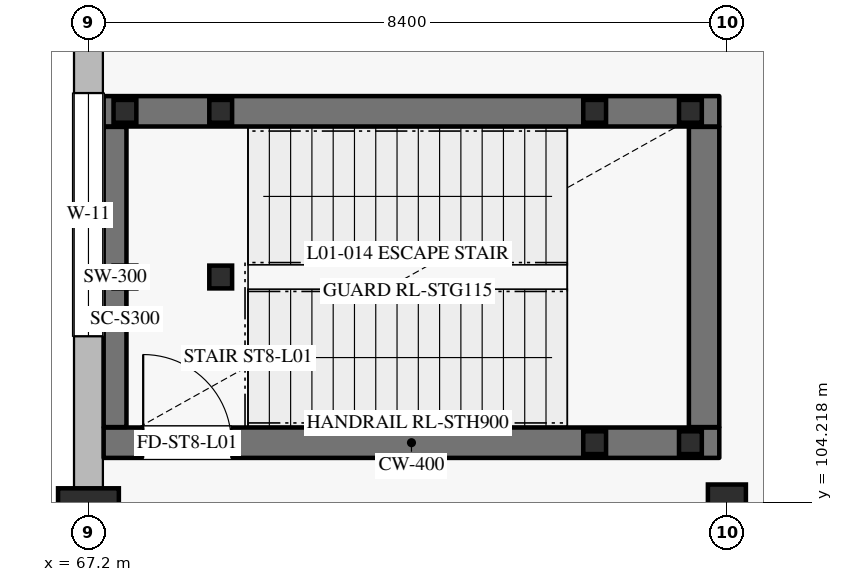
"""IFC4 building model, lengths in metres.
Left out: names, types, materials, properties, quantities, classifications, styles, units other than length and angle.
Written with IfcOpenShell. Run it as: python <this file> out.ifc"""

import sys

from ifc_helpers import new_model, si_unit, direction, frame, frame_2d, origin, origin_2d, place, context, subcontext, project, spatial, rectangle, hollow_rectangle, extrude, element, fill, save


model = new_model("IFC4")
c1 = context("Model", 3, precision=1e-05, world=origin(), true_north=direction((0.0, 1.0)))
c2 = subcontext(c1, "Body", "Model", "MODEL_VIEW")
j1 = project(units=[si_unit("LENGTHUNIT", "METRE"), si_unit("PLANEANGLEUNIT", "RADIAN")], contexts=[c1])
p1 = place(None, origin())
s1 = spatial("IfcSite", under=j1, at=p1, CompositionType="ELEMENT")
p2 = place(p1, origin())
s2 = spatial("IfcBuilding", under=s1, at=p2, CompositionType="ELEMENT")
p3 = place(p2, frame((0.0, 0.0, 6.0)))
s3 = spatial("IfcBuildingStorey", under=s2, at=p3, CompositionType="ELEMENT", Elevation=6.0)
p4 = place(p3, frame((67.2, 104.0, 0.0), z_axis=(0.0, 0.0, 1.0), x_axis=(1.0, 0.0, 0.0)))
e1 = element("IfcColumn", 1, at=p4, inside=s3, PredefinedType="COLUMN", context=c2, shape_type="SweptSolid", body=[
    extrude(rectangle(XDim=0.8, YDim=0.8, at=origin_2d()), origin(), (0.0, 0.0, 1.0), 5.4),
])
p5 = place(p3, frame((75.6, 104.0, 0.0), z_axis=(0.0, 0.0, 1.0), x_axis=(1.0, 0.0, 0.0)))
e2 = element("IfcColumn", 2, at=p5, inside=s3, PredefinedType="COLUMN", context=c2, shape_type="SweptSolid", body=[
    extrude(hollow_rectangle(XDim=0.5, YDim=0.9, WallThickness=0.024, at=origin_2d()), origin(), (0.0, 0.0, 1.0), 5.4),
])
p6 = place(p3, frame((67.2, 104.4, 0.0), z_axis=(0.0, 0.0, 1.0), x_axis=(0.0, 1.0, 0.0)))
e3 = element("IfcWall", 3, at=p6, inside=s3, PredefinedType="SOLIDWALL", context=c2, shape_type="SweptSolid", body=[
    extrude(rectangle(XDim=7.2, YDim=0.38, at=frame_2d((3.6, 0.0))), origin(), (0.0, 0.0, 1.0), 4.67),
])
p7 = place(p6, frame((2.0, 0.0, 1.05)))
e4 = element("IfcOpeningElement", 4, at=p7, cuts=e3, PredefinedType="OPENING", context=c2, shape_type="SweptSolid", body=[
    extrude(rectangle(XDim=3.2, YDim=2.4, at=frame_2d((1.6, 1.2))), frame((0.0, 0.2, 0.0), z_axis=(0.0, -1.0, 0.0), x_axis=(1.0, 0.0, 0.0)), (0.0, 0.0, 1.0), 0.4),
])
p8 = place(p3, frame((67.4, 105.0, 0.0), z_axis=(0.0, 0.0, 1.0), x_axis=(1.0, 0.0, 0.0)))
e5 = element("IfcWall", 5, at=p8, inside=s3, PredefinedType="SHEAR", context=c2, shape_type="SweptSolid", body=[
    extrude(rectangle(XDim=8.1, YDim=0.4, at=frame_2d((4.05, 0.0))), origin(), (0.0, 0.0, 1.0), 5.045),
])
p9 = place(p8, frame((0.52, 0.0, 0.0)))
e6 = element("IfcOpeningElement", 6, at=p9, cuts=e5, PredefinedType="OPENING", context=c2, shape_type="SweptSolid", body=[
    extrude(rectangle(XDim=1.16, YDim=2.2, at=frame_2d((0.58, 1.1))), frame((0.0, 0.21, 0.0), z_axis=(0.0, -1.0, 0.0), x_axis=(1.0, 0.0, 0.0)), (0.0, 0.0, 1.0), 0.42),
])
p10 = place(p3, frame((75.3, 105.205, 0.0), z_axis=(0.0, 0.0, 1.0), x_axis=(0.0, 1.0, 0.0)))
e7 = element("IfcWall", 7, at=p10, inside=s3, PredefinedType="SHEAR", context=c2, shape_type="SweptSolid", body=[
    extrude(rectangle(XDim=3.95, YDim=0.4, at=frame_2d((1.975, 0.0))), origin(), (0.0, 0.0, 1.0), 5.045),
])
p11 = place(p3, frame((67.4, 109.36, 0.0), z_axis=(0.0, 0.0, 1.0), x_axis=(1.0, 0.0, 0.0)))
e8 = element("IfcWall", 8, at=p11, inside=s3, PredefinedType="SHEAR", context=c2, shape_type="SweptSolid", body=[
    extrude(rectangle(XDim=8.1, YDim=0.4, at=frame_2d((4.05, 0.0))), origin(), (0.0, 0.0, 1.0), 5.045),
])
p12 = place(p3, frame((67.55, 105.205, 0.0), z_axis=(0.0, 0.0, 1.0), x_axis=(0.0, 1.0, 0.0)))
e9 = element("IfcWall", 9, at=p12, inside=s3, PredefinedType="SHEAR", context=c2, shape_type="SweptSolid", body=[
    extrude(rectangle(XDim=3.95, YDim=0.3, at=frame_2d((1.975, 0.0))), origin(), (0.0, 0.0, 1.0), 5.045),
])
for number, where, z_axis, x_axis in (
    (10, (67.68, 107.18, 0.0), (0.0, 0.0, 1.0), (1.0, 0.0, 0.0)),
    (11, (67.68, 109.36, 0.0), (0.0, 0.0, 1.0), (1.0, 0.0, 0.0)),
    (12, (68.94, 107.18, 0.0), (0.0, 0.0, 1.0), (1.0, 0.0, 0.0)),
    (13, (68.94, 109.36, 0.0), (0.0, 0.0, 1.0), (1.0, 0.0, 0.0)),
):
    element("IfcColumn", number, at=place(p3, frame(where, z_axis=z_axis, x_axis=x_axis)), inside=s3, PredefinedType="COLUMN", context=c2, shape_type="SweptSolid", body=[
        extrude(hollow_rectangle(XDim=0.3, YDim=0.3, WallThickness=0.012, at=origin_2d()), origin(), (0.0, 0.0, 1.0), 5.22),
    ])
for number, where, z_axis, x_axis in (
    (14, (73.86, 105.0, -3.0), (0.0, 0.0, 1.0), (1.0, 0.0, 0.0)),
    (15, (73.86, 109.36, -3.0), (0.0, 0.0, 1.0), (1.0, 0.0, 0.0)),
    (16, (75.12, 105.0, -3.0), (0.0, 0.0, 1.0), (1.0, 0.0, 0.0)),
    (17, (75.12, 109.36, -3.0), (0.0, 0.0, 1.0), (1.0, 0.0, 0.0)),
):
    element("IfcColumn", number, at=place(p3, frame(where, z_axis=z_axis, x_axis=x_axis)), inside=s3, PredefinedType="COLUMN", context=c2, shape_type="SweptSolid", body=[
        extrude(hollow_rectangle(XDim=0.3, YDim=0.3, WallThickness=0.012, at=origin_2d()), origin(), (0.0, 0.0, 1.0), 5.52),
    ])
p13 = place(p7, origin())
e18 = element("IfcWindow", 18, at=p13, inside=s3, PartitioningType="DOUBLE_PANEL_VERTICAL", PredefinedType="WINDOW", context=c2, shape_type="SweptSolid", body=[
    extrude(rectangle(XDim=3.2, YDim=2.4, at=frame_2d((1.6, 1.2))), frame((0.0, 0.03, 0.0), z_axis=(0.0, -1.0, 0.0), x_axis=(1.0, 0.0, 0.0)), (0.0, 0.0, 1.0), 0.06),
])
fill(e4, e18)
p14 = place(p9, origin())
e19 = element("IfcDoor", 19, at=p14, inside=s3, OperationType="SINGLE_SWING_LEFT", PredefinedType="DOOR", context=c2, shape_type="SweptSolid", body=[
    extrude(rectangle(XDim=1.16, YDim=2.2, at=frame_2d((0.58, 1.1))), frame((0.0, 0.025, 0.0), z_axis=(0.0, -1.0, 0.0), x_axis=(1.0, 0.0, 0.0)), (0.0, 0.0, 1.0), 0.05),
])
fill(e6, e19)
save(model, sys.argv[1])
